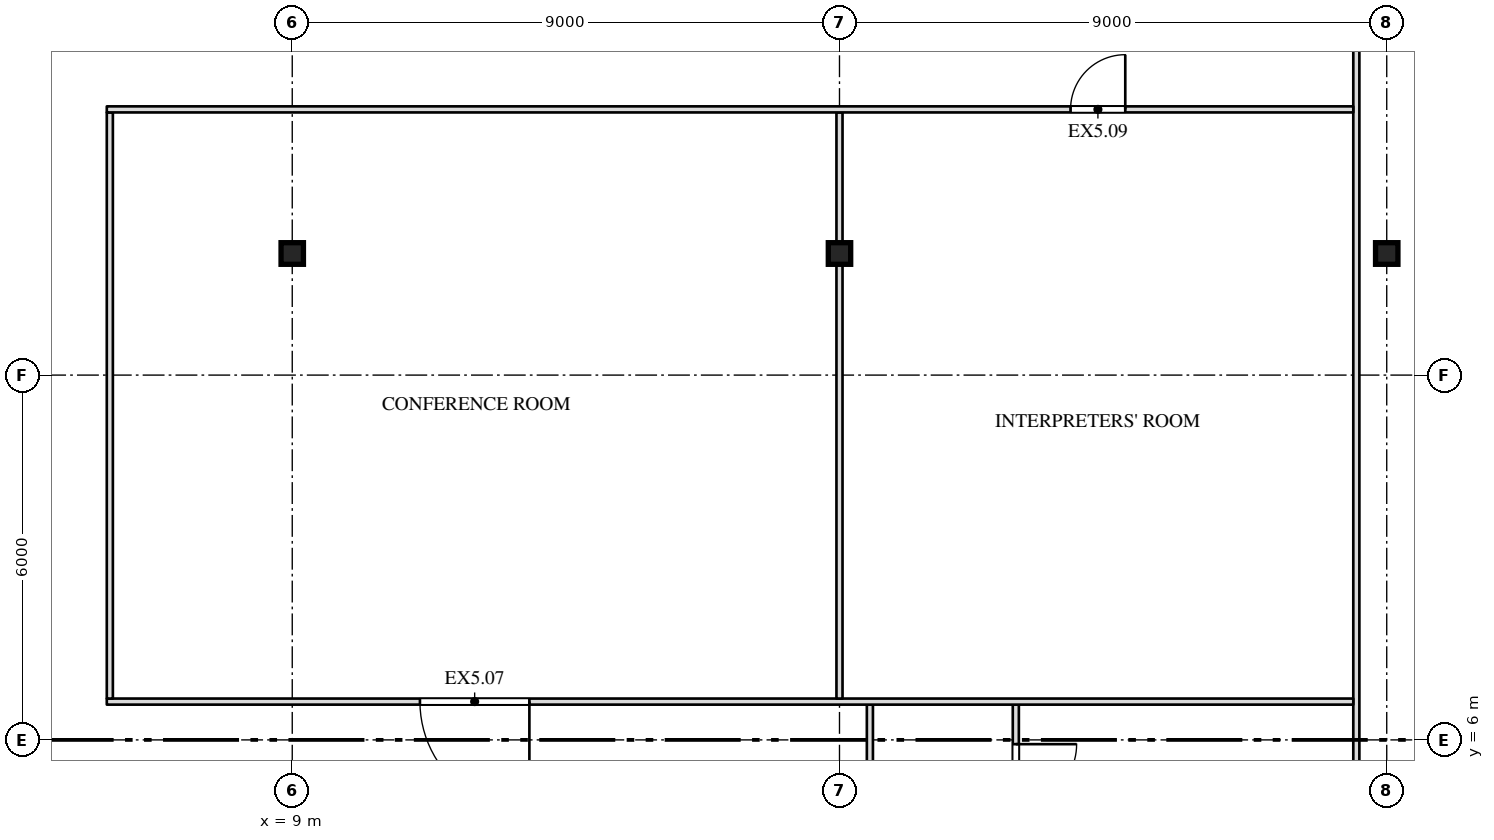
"""IFC4 building model, lengths in metres.
Left out: names, types, materials, properties, quantities, classifications, styles, units other than length and angle.
Written with IfcOpenShell. Run it as: python <this file> out.ifc"""

import sys

from ifc_helpers import new_model, si_unit, direction, frame, frame_2d, origin, origin_2d, place, context, subcontext, project, spatial, rectangle, i_section, extrude, element, fill, save


model = new_model("IFC4")
c1 = context("Model", 3, precision=1e-05, world=origin(), true_north=direction((0.0, 1.0)))
c2 = subcontext(c1, "Body", "Model", "MODEL_VIEW")
j1 = project(units=[si_unit("LENGTHUNIT", "METRE"), si_unit("PLANEANGLEUNIT", "RADIAN")], contexts=[c1])
p1 = place(None, origin())
s1 = spatial("IfcSite", under=j1, at=p1, CompositionType="ELEMENT")
p2 = place(p1, origin())
s2 = spatial("IfcBuilding", under=s1, at=p2, CompositionType="ELEMENT")
p3 = place(p2, frame((0.0, 0.0, 288.5)))
s3 = spatial("IfcBuildingStorey", under=s2, at=p3, CompositionType="ELEMENT", Elevation=288.5)
for number, where, z_axis, x_axis in (
    (1, (9.0, 14.0, 0.0), (0.0, 0.0, 1.0), (1.0, 0.0, 0.0)),
    (2, (18.0, 14.0, 0.0), (0.0, 0.0, 1.0), (1.0, 0.0, 0.0)),
    (3, (27.0, 14.0, 0.0), (0.0, 0.0, 1.0), (1.0, 0.0, 0.0)),
):
    element("IfcColumn", number, at=place(p3, frame(where, z_axis=z_axis, x_axis=x_axis)), inside=s3, PredefinedType="COLUMN", context=c2, shape_type="SweptSolid", body=[
        extrude(i_section(OverallWidth=0.368, OverallDepth=0.356, WebThickness=0.011, FlangeThickness=0.018, at=origin_2d()), origin(), (0.0, 0.0, 1.0), 4.0),
    ])
p4 = place(p3, frame((18.5, -2.0, 0.0), z_axis=(0.0, 0.0, 1.0), x_axis=(0.0, 1.0, 0.0)))
e4 = element("IfcWall", 4, at=p4, inside=s3, PredefinedType="PARTITIONING", context=c2, shape_type="SweptSolid", body=[
    extrude(rectangle(XDim=8.58, YDim=0.1, at=frame_2d((4.29, 0.0))), origin(), (0.0, 0.0, 1.0), 3.78),
])
p5 = place(p4, frame((3.8, 0.0, 0.0)))
e5 = element("IfcOpeningElement", 5, at=p5, cuts=e4, PredefinedType="OPENING", context=c2, shape_type="SweptSolid", body=[
    extrude(rectangle(XDim=1.0, YDim=2.1, at=frame_2d((0.5, 1.05))), frame((0.0, 0.062, 0.0), z_axis=(0.0, -1.0, 0.0), x_axis=(1.0, 0.0, 0.0)), (0.0, 0.0, 1.0), 0.124),
])
p6 = place(p3, frame((20.9, -2.0, 0.0), z_axis=(0.0, 0.0, 1.0), x_axis=(0.0, 1.0, 0.0)))
e6 = element("IfcWall", 6, at=p6, inside=s3, PredefinedType="PARTITIONING", context=c2, shape_type="SweptSolid", body=[
    extrude(rectangle(XDim=8.58, YDim=0.1, at=frame_2d((4.29, 0.0))), origin(), (0.0, 0.0, 1.0), 3.78),
])
p7 = place(p6, frame((1.05, 0.0, 0.0)))
e7 = element("IfcOpeningElement", 7, at=p7, cuts=e6, PredefinedType="OPENING", context=c2, shape_type="SweptSolid", body=[
    extrude(rectangle(XDim=1.0, YDim=2.1, at=frame_2d((0.5, 1.05))), frame((0.0, 0.062, 0.0), z_axis=(0.0, -1.0, 0.0), x_axis=(1.0, 0.0, 0.0)), (0.0, 0.0, 1.0), 0.124),
])
p8 = place(p6, frame((4.165, 0.0, 0.0)))
e8 = element("IfcOpeningElement", 8, at=p8, cuts=e6, PredefinedType="OPENING", context=c2, shape_type="SweptSolid", body=[
    extrude(rectangle(XDim=1.0, YDim=2.1, at=frame_2d((0.5, 1.05))), frame((0.0, 0.062, 0.0), z_axis=(0.0, -1.0, 0.0), x_axis=(1.0, 0.0, 0.0)), (0.0, 0.0, 1.0), 0.124),
])
p9 = place(p6, frame((6.93, 0.0, 0.0)))
e9 = element("IfcOpeningElement", 9, at=p9, cuts=e6, PredefinedType="OPENING", context=c2, shape_type="SweptSolid", body=[
    extrude(rectangle(XDim=1.0, YDim=2.1, at=frame_2d((0.5, 1.05))), frame((0.0, 0.062, 0.0), z_axis=(0.0, -1.0, 0.0), x_axis=(1.0, 0.0, 0.0)), (0.0, 0.0, 1.0), 0.124),
])
p10 = place(p3, frame((26.5, -2.0, 0.0), z_axis=(0.0, 0.0, 1.0), x_axis=(0.0, 1.0, 0.0)))
e10 = element("IfcWall", 10, at=p10, inside=s3, PredefinedType="PARTITIONING", context=c2, shape_type="SweptSolid", body=[
    extrude(rectangle(XDim=23.19, YDim=0.1, at=frame_2d((11.595, 0.0))), origin(), (0.0, 0.0, 1.0), 3.78),
])
p11 = place(p3, frame((5.95, 6.63, 0.0), z_axis=(0.0, 0.0, 1.0), x_axis=(1.0, 0.0, 0.0)))
e11 = element("IfcWall", 11, at=p11, inside=s3, PredefinedType="PARTITIONING", context=c2, shape_type="SweptSolid", body=[
    extrude(rectangle(XDim=20.5, YDim=0.1, at=frame_2d((10.25, 0.0))), origin(), (0.0, 0.0, 1.0), 3.78),
])
p12 = place(p11, frame((5.15, 0.0, 0.0)))
e12 = element("IfcOpeningElement", 12, at=p12, cuts=e11, PredefinedType="OPENING", context=c2, shape_type="SweptSolid", body=[
    extrude(rectangle(XDim=1.8, YDim=2.1, at=frame_2d((0.9, 1.05))), frame((0.0, 0.062, 0.0), z_axis=(0.0, -1.0, 0.0), x_axis=(1.0, 0.0, 0.0)), (0.0, 0.0, 1.0), 0.124),
])
p13 = place(p3, frame((6.0, 6.68, 0.0), z_axis=(0.0, 0.0, 1.0), x_axis=(0.0, 1.0, 0.0)))
e13 = element("IfcWall", 13, at=p13, inside=s3, PredefinedType="PARTITIONING", context=c2, shape_type="SweptSolid", body=[
    extrude(rectangle(XDim=9.64, YDim=0.1, at=frame_2d((4.82, 0.0))), origin(), (0.0, 0.0, 1.0), 3.78),
])
p14 = place(p3, frame((18.0, 6.68, 0.0), z_axis=(0.0, 0.0, 1.0), x_axis=(0.0, 1.0, 0.0)))
e14 = element("IfcWall", 14, at=p14, inside=s3, PredefinedType="PARTITIONING", context=c2, shape_type="SweptSolid", body=[
    extrude(rectangle(XDim=7.142, YDim=0.1, at=frame_2d((3.571, 0.0))), origin(), (0.0, 0.0, 1.0), 3.247),
])
p15 = place(p3, frame((18.0, 14.178, 0.0), z_axis=(0.0, 0.0, 1.0), x_axis=(0.0, 1.0, 0.0)))
e15 = element("IfcWall", 15, at=p15, inside=s3, PredefinedType="PARTITIONING", context=c2, shape_type="SweptSolid", body=[
    extrude(rectangle(XDim=2.142, YDim=0.1, at=frame_2d((1.071, 0.0))), origin(), (0.0, 0.0, 1.0), 3.247),
])
p16 = place(p3, frame((5.95, 16.37, 0.0), z_axis=(0.0, 0.0, 1.0), x_axis=(1.0, 0.0, 0.0)))
e16 = element("IfcWall", 16, at=p16, inside=s3, PredefinedType="PARTITIONING", context=c2, shape_type="SweptSolid", body=[
    extrude(rectangle(XDim=20.5, YDim=0.1, at=frame_2d((10.25, 0.0))), origin(), (0.0, 0.0, 1.0), 3.78),
])
p17 = place(p16, frame((15.85, 0.0, 0.0)))
e17 = element("IfcOpeningElement", 17, at=p17, cuts=e16, PredefinedType="OPENING", context=c2, shape_type="SweptSolid", body=[
    extrude(rectangle(XDim=0.9, YDim=2.1, at=frame_2d((0.45, 1.05))), frame((0.0, 0.062, 0.0), z_axis=(0.0, -1.0, 0.0), x_axis=(1.0, 0.0, 0.0)), (0.0, 0.0, 1.0), 0.124),
])
p18 = place(p9, origin())
e18 = element("IfcDoor", 18, at=p18, inside=s3, OperationType="SINGLE_SWING_LEFT", PredefinedType="DOOR", context=c2, shape_type="SweptSolid", body=[
    extrude(rectangle(XDim=1.0, YDim=2.1, at=frame_2d((0.5, 1.05))), frame((0.0, 0.025, 0.0), z_axis=(0.0, -1.0, 0.0), x_axis=(1.0, 0.0, 0.0)), (0.0, 0.0, 1.0), 0.05),
])
fill(e9, e18)
p19 = place(p12, origin())
e19 = element("IfcDoor", 19, at=p19, inside=s3, OperationType="DOUBLE_DOOR_SINGLE_SWING", PredefinedType="DOOR", context=c2, shape_type="SweptSolid", body=[
    extrude(rectangle(XDim=1.8, YDim=2.1, at=frame_2d((0.9, 1.05))), frame((0.0, 0.025, 0.0), z_axis=(0.0, -1.0, 0.0), x_axis=(1.0, 0.0, 0.0)), (0.0, 0.0, 1.0), 0.05),
])
fill(e12, e19)
p20 = place(p17, origin())
e20 = element("IfcDoor", 20, at=p20, inside=s3, OperationType="SINGLE_SWING_RIGHT", PredefinedType="DOOR", context=c2, shape_type="SweptSolid", body=[
    extrude(rectangle(XDim=0.9, YDim=2.1, at=frame_2d((0.45, 1.05))), frame((0.0, 0.025, 0.0), z_axis=(0.0, -1.0, 0.0), x_axis=(1.0, 0.0, 0.0)), (0.0, 0.0, 1.0), 0.05),
])
fill(e17, e20)
save(model, sys.argv[1])
